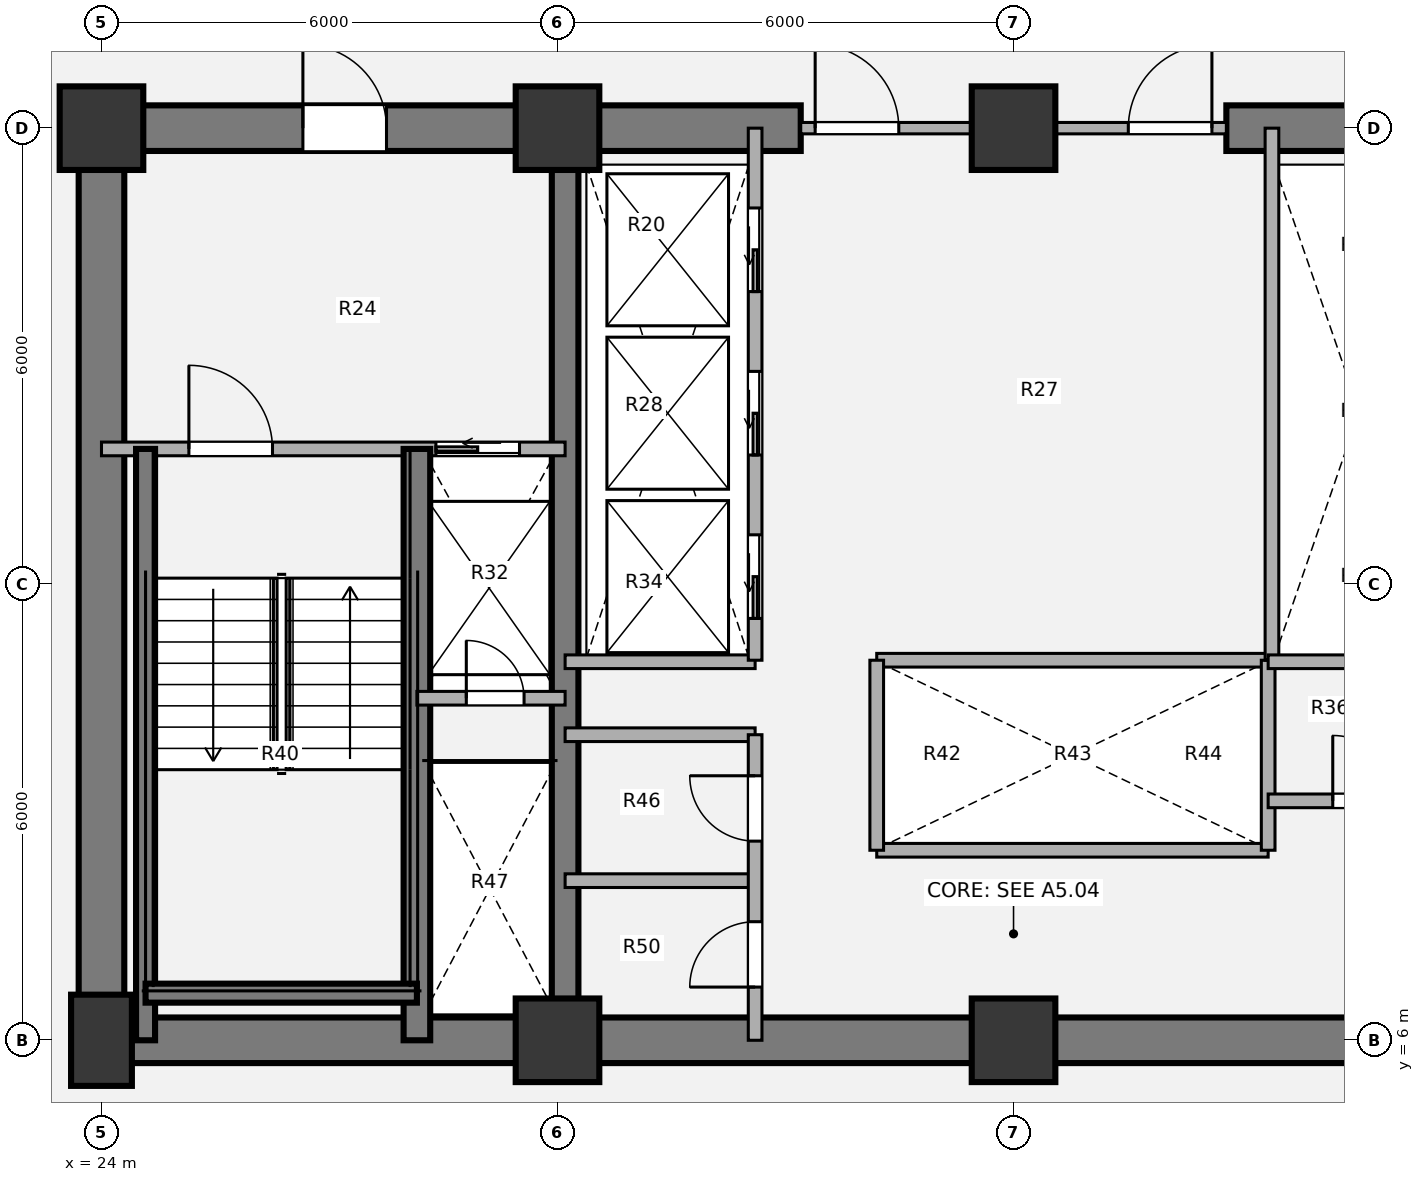
"""IFC4 building model, lengths in metres.
Left out: names, types, materials, properties, quantities, classifications, styles, units other than length and angle.
Written with IfcOpenShell. Run it as: python <this file> out.ifc"""

import sys

from ifc_helpers import new_model, si_unit, direction, frame, frame_2d, origin, origin_2d, place, context, subcontext, project, spatial, rectangle, extrude, source, transform, mapped, element, fill, save


model = new_model("IFC4")
c1 = context("Model", 3, precision=1e-05, world=origin(), true_north=direction((0.0, 1.0)))
c2 = subcontext(c1, "Body", "Model", "MODEL_VIEW")
j1 = project(units=[si_unit("LENGTHUNIT", "METRE"), si_unit("PLANEANGLEUNIT", "RADIAN")], contexts=[c1])
p1 = place(None, origin())
s1 = spatial("IfcSite", under=j1, at=p1, CompositionType="ELEMENT")
p2 = place(p1, origin())
s2 = spatial("IfcBuilding", under=s1, at=p2, CompositionType="ELEMENT")
p3 = place(p2, frame((0.0, 0.0, 42.12)))
s3 = spatial("IfcBuildingStorey", under=s2, at=p3, CompositionType="ELEMENT", Elevation=42.12)
m1 = source(origin(), c2, "Body", "SweptSolid", [
    extrude(rectangle(XDim=0.8, YDim=1.2, at=origin_2d()), origin(), (0.0, 0.0, 1.0), 3.78),
])
p4 = place(p3, frame((24.0, 6.0, 0.0), z_axis=(0.0, 0.0, 1.0), x_axis=(1.0, 0.0, 0.0)))
e1 = element("IfcColumn", 1, at=p4, inside=s3, PredefinedType="COLUMN", context=c2, shape_type="MappedRepresentation", body=[
    mapped(m1, transform((0.0, 0.0, 0.0), x_axis=(1.0, 0.0, 0.0), y_axis=(0.0, 1.0, 0.0), z_axis=(0.0, 0.0, 1.0), scale=1.0)),
])
m2 = source(origin(), c2, "Body", "SweptSolid", [
    extrude(rectangle(XDim=1.1, YDim=1.1, at=origin_2d()), origin(), (0.0, 0.0, 1.0), 3.78),
])
for number, where, z_axis, x_axis in (
    (2, (30.0, 6.0, 0.0), (0.0, 0.0, 1.0), (1.0, 0.0, 0.0)),
    (3, (36.0, 6.0, 0.0), (0.0, 0.0, 1.0), (1.0, 0.0, 0.0)),
    (4, (24.0, 18.0, 0.0), (0.0, 0.0, 1.0), (1.0, 0.0, 0.0)),
    (5, (30.0, 18.0, 0.0), (0.0, 0.0, 1.0), (1.0, 0.0, 0.0)),
    (6, (36.0, 18.0, 0.0), (0.0, 0.0, 1.0), (1.0, 0.0, 0.0)),
):
    element("IfcColumn", number, at=place(p3, frame(where, z_axis=z_axis, x_axis=x_axis)), inside=s3, PredefinedType="COLUMN", context=c2, shape_type="MappedRepresentation", body=[
        mapped(m2, transform((0.0, 0.0, 0.0), x_axis=(1.0, 0.0, 0.0), y_axis=(0.0, 1.0, 0.0), z_axis=(0.0, 0.0, 1.0), scale=1.0)),
    ])
p5 = place(p3, frame((48.3, 6.0, 0.0), z_axis=(0.0, 0.0, 1.0), x_axis=(-1.0, 0.0, 0.0)))
e7 = element("IfcWall", 7, at=p5, inside=s3, PredefinedType="SHEAR", context=c2, shape_type="SweptSolid", body=[
    extrude(rectangle(XDim=24.6, YDim=0.6, at=frame_2d((12.3, 0.0))), origin(), (0.0, 0.0, 1.0), 3.78),
])
p6 = place(p3, frame((24.0, 6.0, 0.0), z_axis=(0.0, 0.0, 1.0), x_axis=(0.0, 1.0, 0.0)))
e8 = element("IfcWall", 8, at=p6, inside=s3, PredefinedType="SHEAR", context=c2, shape_type="SweptSolid", body=[
    extrude(rectangle(XDim=12.0, YDim=0.6, at=frame_2d((6.0, 0.0))), origin(), (0.0, 0.0, 1.0), 3.78),
])
p7 = place(p3, frame((23.7, 18.0, 0.0), z_axis=(0.0, 0.0, 1.0), x_axis=(1.0, 0.0, 0.0)))
e9 = element("IfcWall", 9, at=p7, inside=s3, PredefinedType="SHEAR", context=c2, shape_type="SweptSolid", body=[
    extrude(rectangle(XDim=9.5, YDim=0.6, at=frame_2d((4.75, 0.0))), origin(), (0.0, 0.0, 1.0), 3.78),
])
p8 = place(p7, frame((2.95, 0.0, 0.0)))
e10 = element("IfcOpeningElement", 10, at=p8, cuts=e9, PredefinedType="OPENING", context=c2, shape_type="SweptSolid", body=[
    extrude(rectangle(XDim=1.1, YDim=2.1, at=origin_2d()), frame((0.55, 0.31, 1.05), z_axis=(0.0, -1.0, 0.0), x_axis=(1.0, 0.0, 0.0)), (0.0, 0.0, 1.0), 0.62),
])
p9 = place(p3, frame((38.8, 18.0, 0.0), z_axis=(0.0, 0.0, 1.0), x_axis=(1.0, 0.0, 0.0)))
e11 = element("IfcWall", 11, at=p9, inside=s3, PredefinedType="SHEAR", context=c2, shape_type="SweptSolid", body=[
    extrude(rectangle(XDim=9.5, YDim=0.6, at=frame_2d((4.75, 0.0))), origin(), (0.0, 0.0, 1.0), 3.78),
])
p10 = place(p9, frame((5.45, 0.0, 0.0)))
e12 = element("IfcOpeningElement", 12, at=p10, cuts=e11, PredefinedType="OPENING", context=c2, shape_type="SweptSolid", body=[
    extrude(rectangle(XDim=1.1, YDim=2.1, at=origin_2d()), frame((0.55, 0.31, 1.05), z_axis=(0.0, -1.0, 0.0), x_axis=(1.0, 0.0, 0.0)), (0.0, 0.0, 1.0), 0.62),
])
p11 = place(p3, frame((30.1, 6.0, 0.0), z_axis=(0.0, 0.0, 1.0), x_axis=(0.0, 1.0, 0.0)))
e13 = element("IfcWall", 13, at=p11, inside=s3, PredefinedType="SHEAR", context=c2, shape_type="SweptSolid", body=[
    extrude(rectangle(XDim=12.0, YDim=0.35, at=frame_2d((6.0, 0.0))), origin(), (0.0, 0.0, 1.0), 3.78),
])
for number, where, z_axis, x_axis in (
    (14, (34.2, 11.0, 0.0), (0.0, 0.0, 1.0), (1.0, 0.0, 0.0)),
    (15, (34.2, 8.5, 0.0), (0.0, 0.0, 1.0), (1.0, 0.0, 0.0)),
):
    element("IfcWall", number, at=place(p3, frame(where, z_axis=z_axis, x_axis=x_axis)), inside=s3, PredefinedType="PARTITIONING", context=c2, shape_type="SweptSolid", body=[
        extrude(rectangle(XDim=5.15, YDim=0.18, at=frame_2d((2.575, 0.0))), origin(), (0.0, 0.0, 1.0), 3.5),
    ])
for number, where, z_axis, x_axis in (
    (16, (34.2, 8.5, 0.0), (0.0, 0.0, 1.0), (0.0, 1.0, 0.0)),
    (17, (39.35, 8.5, 0.0), (0.0, 0.0, 1.0), (0.0, 1.0, 0.0)),
):
    element("IfcWall", number, at=place(p3, frame(where, z_axis=z_axis, x_axis=x_axis)), inside=s3, PredefinedType="PARTITIONING", context=c2, shape_type="SweptSolid", body=[
        extrude(rectangle(XDim=2.5, YDim=0.18, at=frame_2d((1.25, 0.0))), origin(), (0.0, 0.0, 1.0), 3.5),
    ])
p12 = place(p3, frame((39.4, 11.0, 0.0), z_axis=(0.0, 0.0, 1.0), x_axis=(0.0, 1.0, 0.0)))
e18 = element("IfcWall", 18, at=p12, inside=s3, PredefinedType="PARTITIONING", context=c2, shape_type="SweptSolid", body=[
    extrude(rectangle(XDim=7.0, YDim=0.18, at=frame_2d((3.5, 0.0))), origin(), (0.0, 0.0, 1.0), 3.5),
])
p13 = place(p3, frame((30.1, 10.98, 0.0), z_axis=(0.0, 0.0, 1.0), x_axis=(1.0, 0.0, 0.0)))
e19 = element("IfcWall", 19, at=p13, inside=s3, PredefinedType="PARTITIONING", context=c2, shape_type="SweptSolid", body=[
    extrude(rectangle(XDim=2.5, YDim=0.18, at=frame_2d((1.25, 0.0))), origin(), (0.0, 0.0, 1.0), 3.5),
])
p14 = place(p3, frame((39.35, 10.98, 0.0), z_axis=(0.0, 0.0, 1.0), x_axis=(1.0, 0.0, 0.0)))
e20 = element("IfcWall", 20, at=p14, inside=s3, PredefinedType="PARTITIONING", context=c2, shape_type="SweptSolid", body=[
    extrude(rectangle(XDim=2.55, YDim=0.18, at=frame_2d((1.275, 0.0))), origin(), (0.0, 0.0, 1.0), 3.5),
])
for number, where, z_axis, x_axis in (
    (21, (30.1, 8.1, 0.0), (0.0, 0.0, 1.0), (1.0, 0.0, 0.0)),
    (22, (30.1, 10.02, 0.0), (0.0, 0.0, 1.0), (1.0, 0.0, 0.0)),
):
    element("IfcWall", number, at=place(p3, frame(where, z_axis=z_axis, x_axis=x_axis)), inside=s3, PredefinedType="PARTITIONING", context=c2, shape_type="SweptSolid", body=[
        extrude(rectangle(XDim=2.5, YDim=0.18, at=frame_2d((1.25, 0.0))), origin(), (0.0, 0.0, 1.0), 3.5),
    ])
p15 = place(p3, frame((32.6, 6.0, 0.0), z_axis=(0.0, 0.0, 1.0), x_axis=(0.0, 1.0, 0.0)))
e23 = element("IfcWall", 23, at=p15, inside=s3, PredefinedType="PARTITIONING", context=c2, shape_type="SweptSolid", body=[
    extrude(rectangle(XDim=4.02, YDim=0.18, at=frame_2d((2.01, 0.0))), origin(), (0.0, 0.0, 1.0), 3.5),
])
p16 = place(p15, frame((0.7, 0.0, 0.0)))
e24 = element("IfcOpeningElement", 24, at=p16, cuts=e23, PredefinedType="OPENING", context=c2, shape_type="SweptSolid", body=[
    extrude(rectangle(XDim=0.86, YDim=2.1, at=origin_2d()), frame((0.43, 0.1, 1.05), z_axis=(0.0, -1.0, 0.0), x_axis=(1.0, 0.0, 0.0)), (0.0, 0.0, 1.0), 0.2),
])
p17 = place(p15, frame((2.62, 0.0, 0.0)))
e25 = element("IfcOpeningElement", 25, at=p17, cuts=e23, PredefinedType="OPENING", context=c2, shape_type="SweptSolid", body=[
    extrude(rectangle(XDim=0.86, YDim=2.1, at=origin_2d()), frame((0.43, 0.1, 1.05), z_axis=(0.0, -1.0, 0.0), x_axis=(1.0, 0.0, 0.0)), (0.0, 0.0, 1.0), 0.2),
])
p18 = place(p3, frame((39.35, 9.15, 0.0), z_axis=(0.0, 0.0, 1.0), x_axis=(1.0, 0.0, 0.0)))
e26 = element("IfcWall", 26, at=p18, inside=s3, PredefinedType="PARTITIONING", context=c2, shape_type="SweptSolid", body=[
    extrude(rectangle(XDim=2.55, YDim=0.18, at=frame_2d((1.275, 0.0))), origin(), (0.0, 0.0, 1.0), 3.5),
])
p19 = place(p18, frame((0.85, 0.0, 0.0)))
e27 = element("IfcOpeningElement", 27, at=p19, cuts=e26, PredefinedType="OPENING", context=c2, shape_type="SweptSolid", body=[
    extrude(rectangle(XDim=0.86, YDim=2.1, at=origin_2d()), frame((0.43, 0.1, 1.05), z_axis=(0.0, -1.0, 0.0), x_axis=(1.0, 0.0, 0.0)), (0.0, 0.0, 1.0), 0.2),
])
p20 = place(p3, frame((33.2, 18.0, 0.0), z_axis=(0.0, 0.0, 1.0), x_axis=(1.0, 0.0, 0.0)))
e28 = element("IfcWall", 28, at=p20, inside=s3, PredefinedType="PARTITIONING", context=c2, shape_type="SweptSolid", body=[
    extrude(rectangle(XDim=5.6, YDim=0.15, at=frame_2d((2.8, 0.0))), origin(), (0.0, 0.0, 1.0), 2.315),
])
p21 = place(p20, frame((0.19, 0.0, 0.0)))
e29 = element("IfcOpeningElement", 29, at=p21, cuts=e28, PredefinedType="OPENING", context=c2, shape_type="SweptSolid", body=[
    extrude(rectangle(XDim=1.1, YDim=2.1, at=origin_2d()), frame((0.55, 0.085, 1.05), z_axis=(0.0, -1.0, 0.0), x_axis=(1.0, 0.0, 0.0)), (0.0, 0.0, 1.0), 0.17),
])
p22 = place(p20, frame((4.31, 0.0, 0.0)))
e30 = element("IfcOpeningElement", 30, at=p22, cuts=e28, PredefinedType="OPENING", context=c2, shape_type="SweptSolid", body=[
    extrude(rectangle(XDim=1.1, YDim=2.1, at=origin_2d()), frame((0.55, 0.085, 1.05), z_axis=(0.0, -1.0, 0.0), x_axis=(1.0, 0.0, 0.0)), (0.0, 0.0, 1.0), 0.17),
])
p23 = place(p3, frame((24.0, 13.78, 0.0), z_axis=(0.0, 0.0, 1.0), x_axis=(1.0, 0.0, 0.0)))
e31 = element("IfcWall", 31, at=p23, inside=s3, PredefinedType="PARTITIONING", context=c2, shape_type="SweptSolid", body=[
    extrude(rectangle(XDim=6.1, YDim=0.18, at=frame_2d((3.05, 0.0))), origin(), (0.0, 0.0, 1.0), 3.5),
])
p24 = place(p23, frame((1.15, 0.0, 0.0)))
e32 = element("IfcOpeningElement", 32, at=p24, cuts=e31, PredefinedType="OPENING", context=c2, shape_type="SweptSolid", body=[
    extrude(rectangle(XDim=1.1, YDim=2.1, at=origin_2d()), frame((0.55, 0.1, 1.05), z_axis=(0.0, -1.0, 0.0), x_axis=(1.0, 0.0, 0.0)), (0.0, 0.0, 1.0), 0.2),
])
p25 = place(p23, frame((4.4, 0.0, 0.0)))
e33 = element("IfcOpeningElement", 33, at=p25, cuts=e31, PredefinedType="OPENING", context=c2, shape_type="SweptSolid", body=[
    extrude(rectangle(XDim=1.1, YDim=2.1, at=origin_2d()), frame((0.55, 0.1, 1.05), z_axis=(0.0, -1.0, 0.0), x_axis=(1.0, 0.0, 0.0)), (0.0, 0.0, 1.0), 0.2),
])
p26 = place(p3, frame((28.15, 6.0, 0.0), z_axis=(0.0, 0.0, 1.0), x_axis=(0.0, 1.0, 0.0)))
e34 = element("IfcWall", 34, at=p26, inside=s3, PredefinedType="SHEAR", context=c2, shape_type="SweptSolid", body=[
    extrude(rectangle(XDim=7.78, YDim=0.35, at=frame_2d((3.89, 0.0))), origin(), (0.0, 0.0, 1.0), 3.85),
])
p27 = place(p3, frame((24.58, 6.0, 0.0), z_axis=(0.0, 0.0, 1.0), x_axis=(0.0, 1.0, 0.0)))
e35 = element("IfcWall", 35, at=p27, inside=s3, PredefinedType="SHEAR", context=c2, shape_type="SweptSolid", body=[
    extrude(rectangle(XDim=7.78, YDim=0.25, at=frame_2d((3.89, 0.0))), origin(), (0.0, 0.0, 1.0), 3.85),
])
p28 = place(p3, frame((24.58, 6.62, 0.0), z_axis=(0.0, 0.0, 1.0), x_axis=(1.0, 0.0, 0.0)))
e36 = element("IfcWall", 36, at=p28, inside=s3, PredefinedType="SHEAR", context=c2, shape_type="SweptSolid", body=[
    extrude(rectangle(XDim=3.57, YDim=0.25, at=frame_2d((1.785, 0.0))), origin(), (0.0, 0.0, 1.0), 3.85),
])
p29 = place(p3, frame((28.15, 10.5, 0.0), z_axis=(0.0, 0.0, 1.0), x_axis=(1.0, 0.0, 0.0)))
e37 = element("IfcWall", 37, at=p29, inside=s3, PredefinedType="PARTITIONING", context=c2, shape_type="SweptSolid", body=[
    extrude(rectangle(XDim=1.95, YDim=0.18, at=frame_2d((0.975, 0.0))), origin(), (0.0, 0.0, 1.0), 3.5),
])
p30 = place(p29, frame((0.65, 0.0, 0.0)))
e38 = element("IfcOpeningElement", 38, at=p30, cuts=e37, PredefinedType="OPENING", context=c2, shape_type="SweptSolid", body=[
    extrude(rectangle(XDim=0.76, YDim=2.05, at=origin_2d()), frame((0.38, 0.1, 1.025), z_axis=(0.0, -1.0, 0.0), x_axis=(1.0, 0.0, 0.0)), (0.0, 0.0, 1.0), 0.2),
])
p31 = place(p3, frame((32.6, 11.0, 0.0), z_axis=(0.0, 0.0, 1.0), x_axis=(0.0, 1.0, 0.0)))
e39 = element("IfcWall", 39, at=p31, inside=s3, PredefinedType="PARTITIONING", context=c2, shape_type="SweptSolid", body=[
    extrude(rectangle(XDim=7.0, YDim=0.18, at=frame_2d((3.5, 0.0))), origin(), (0.0, 0.0, 1.0), 3.5),
])
p32 = place(p31, frame((0.55, 0.0, 0.0)))
e40 = element("IfcOpeningElement", 40, at=p32, cuts=e39, PredefinedType="OPENING", context=c2, shape_type="SweptSolid", body=[
    extrude(rectangle(XDim=1.1, YDim=2.1, at=origin_2d()), frame((0.55, 0.1, 1.05), z_axis=(0.0, -1.0, 0.0), x_axis=(1.0, 0.0, 0.0)), (0.0, 0.0, 1.0), 0.2),
])
p33 = place(p31, frame((2.7, 0.0, 0.0)))
e41 = element("IfcOpeningElement", 41, at=p33, cuts=e39, PredefinedType="OPENING", context=c2, shape_type="SweptSolid", body=[
    extrude(rectangle(XDim=1.1, YDim=2.1, at=origin_2d()), frame((0.55, 0.1, 1.05), z_axis=(0.0, -1.0, 0.0), x_axis=(1.0, 0.0, 0.0)), (0.0, 0.0, 1.0), 0.2),
])
p34 = place(p31, frame((4.85, 0.0, 0.0)))
e42 = element("IfcOpeningElement", 42, at=p34, cuts=e39, PredefinedType="OPENING", context=c2, shape_type="SweptSolid", body=[
    extrude(rectangle(XDim=1.1, YDim=2.1, at=origin_2d()), frame((0.55, 0.1, 1.05), z_axis=(0.0, -1.0, 0.0), x_axis=(1.0, 0.0, 0.0)), (0.0, 0.0, 1.0), 0.2),
])
m3 = source(origin(), c2, "Body", "SweptSolid", [
    extrude(rectangle(XDim=0.86, YDim=2.1, at=origin_2d()), frame((0.43, 0.025, 1.05), z_axis=(0.0, -1.0, 0.0), x_axis=(1.0, 0.0, 0.0)), (0.0, 0.0, 1.0), 0.05),
])
p35 = place(p16, origin())
e43 = element("IfcDoor", 43, at=p35, inside=s3, OperationType="SINGLE_SWING_LEFT", PredefinedType="DOOR", context=c2, shape_type="MappedRepresentation", body=[
    mapped(m3, transform((0.0, 0.0, 0.0), x_axis=(1.0, 0.0, 0.0), y_axis=(0.0, 1.0, 0.0), z_axis=(0.0, 0.0, 1.0), scale=1.0)),
])
fill(e24, e43)
p36 = place(p17, origin())
e44 = element("IfcDoor", 44, at=p36, inside=s3, OperationType="SINGLE_SWING_RIGHT", PredefinedType="DOOR", context=c2, shape_type="MappedRepresentation", body=[
    mapped(m3, transform((0.0, 0.0, 0.0), x_axis=(1.0, 0.0, 0.0), y_axis=(0.0, 1.0, 0.0), z_axis=(0.0, 0.0, 1.0), scale=1.0)),
])
fill(e25, e44)
p37 = place(p19, origin())
e45 = element("IfcDoor", 45, at=p37, inside=s3, OperationType="SINGLE_SWING_LEFT", PredefinedType="DOOR", context=c2, shape_type="MappedRepresentation", body=[
    mapped(m3, transform((0.0, 0.0, 0.0), x_axis=(1.0, 0.0, 0.0), y_axis=(0.0, 1.0, 0.0), z_axis=(0.0, 0.0, 1.0), scale=1.0)),
])
fill(e27, e45)
m4 = source(origin(), c2, "Body", "SweptSolid", [
    extrude(rectangle(XDim=1.1, YDim=2.1, at=origin_2d()), frame((0.55, 0.025, 1.05), z_axis=(0.0, -1.0, 0.0), x_axis=(1.0, 0.0, 0.0)), (0.0, 0.0, 1.0), 0.05),
])
p38 = place(p21, origin())
e46 = element("IfcDoor", 46, at=p38, inside=s3, OperationType="SINGLE_SWING_LEFT", PredefinedType="DOOR", context=c2, shape_type="MappedRepresentation", body=[
    mapped(m4, transform((0.0, 0.0, 0.0), x_axis=(1.0, 0.0, 0.0), y_axis=(0.0, 1.0, 0.0), z_axis=(0.0, 0.0, 1.0), scale=1.0)),
])
fill(e29, e46)
p39 = place(p22, origin())
e47 = element("IfcDoor", 47, at=p39, inside=s3, OperationType="SINGLE_SWING_RIGHT", PredefinedType="DOOR", context=c2, shape_type="MappedRepresentation", body=[
    mapped(m4, transform((0.0, 0.0, 0.0), x_axis=(1.0, 0.0, 0.0), y_axis=(0.0, 1.0, 0.0), z_axis=(0.0, 0.0, 1.0), scale=1.0)),
])
fill(e30, e47)
m5 = source(origin(), c2, "Body", "SweptSolid", [
    extrude(rectangle(XDim=1.1, YDim=2.1, at=origin_2d()), frame((0.55, 0.025, 1.05), z_axis=(0.0, -1.0, 0.0), x_axis=(1.0, 0.0, 0.0)), (0.0, 0.0, 1.0), 0.05),
])
p40 = place(p24, origin())
e48 = element("IfcDoor", 48, at=p40, inside=s3, OperationType="SINGLE_SWING_LEFT", PredefinedType="DOOR", context=c2, shape_type="MappedRepresentation", body=[
    mapped(m5, transform((0.0, 0.0, 0.0), x_axis=(1.0, 0.0, 0.0), y_axis=(0.0, 1.0, 0.0), z_axis=(0.0, 0.0, 1.0), scale=1.0)),
])
fill(e32, e48)
m6 = source(origin(), c2, "Body", "SweptSolid", [
    extrude(rectangle(XDim=1.1, YDim=2.1, at=origin_2d()), frame((0.55, 0.025, 1.05), z_axis=(0.0, -1.0, 0.0), x_axis=(1.0, 0.0, 0.0)), (0.0, 0.0, 1.0), 0.05),
])
p41 = place(p25, origin())
e49 = element("IfcDoor", 49, at=p41, inside=s3, OperationType="SLIDING_TO_LEFT", PredefinedType="DOOR", context=c2, shape_type="MappedRepresentation", body=[
    mapped(m6, transform((0.0, 0.0, 0.0), x_axis=(1.0, 0.0, 0.0), y_axis=(0.0, 1.0, 0.0), z_axis=(0.0, 0.0, 1.0), scale=1.0)),
])
fill(e33, e49)
m7 = source(origin(), c2, "Body", "SweptSolid", [
    extrude(rectangle(XDim=0.76, YDim=2.05, at=origin_2d()), frame((0.38, 0.025, 1.025), z_axis=(0.0, -1.0, 0.0), x_axis=(1.0, 0.0, 0.0)), (0.0, 0.0, 1.0), 0.05),
])
p42 = place(p30, origin())
e50 = element("IfcDoor", 50, at=p42, inside=s3, OperationType="SINGLE_SWING_LEFT", PredefinedType="DOOR", context=c2, shape_type="MappedRepresentation", body=[
    mapped(m7, transform((0.0, 0.0, 0.0), x_axis=(1.0, 0.0, 0.0), y_axis=(0.0, 1.0, 0.0), z_axis=(0.0, 0.0, 1.0), scale=1.0)),
])
fill(e38, e50)
p43 = place(p8, origin())
e51 = element("IfcDoor", 51, at=p43, inside=s3, OperationType="SINGLE_SWING_LEFT", PredefinedType="DOOR", context=c2, shape_type="MappedRepresentation", body=[
    mapped(m4, transform((0.0, 0.0, 0.0), x_axis=(1.0, 0.0, 0.0), y_axis=(0.0, 1.0, 0.0), z_axis=(0.0, 0.0, 1.0), scale=1.0)),
])
fill(e10, e51)
p44 = place(p32, origin())
e52 = element("IfcDoor", 52, at=p44, inside=s3, OperationType="SLIDING_TO_LEFT", PredefinedType="DOOR", context=c2, shape_type="MappedRepresentation", body=[
    mapped(m6, transform((0.0, 0.0, 0.0), x_axis=(1.0, 0.0, 0.0), y_axis=(0.0, 1.0, 0.0), z_axis=(0.0, 0.0, 1.0), scale=1.0)),
])
fill(e40, e52)
p45 = place(p33, origin())
e53 = element("IfcDoor", 53, at=p45, inside=s3, OperationType="SLIDING_TO_LEFT", PredefinedType="DOOR", context=c2, shape_type="MappedRepresentation", body=[
    mapped(m6, transform((0.0, 0.0, 0.0), x_axis=(1.0, 0.0, 0.0), y_axis=(0.0, 1.0, 0.0), z_axis=(0.0, 0.0, 1.0), scale=1.0)),
])
fill(e41, e53)
p46 = place(p34, origin())
e54 = element("IfcDoor", 54, at=p46, inside=s3, OperationType="SLIDING_TO_LEFT", PredefinedType="DOOR", context=c2, shape_type="MappedRepresentation", body=[
    mapped(m6, transform((0.0, 0.0, 0.0), x_axis=(1.0, 0.0, 0.0), y_axis=(0.0, 1.0, 0.0), z_axis=(0.0, 0.0, 1.0), scale=1.0)),
])
fill(e42, e54)
save(model, sys.argv[1])
